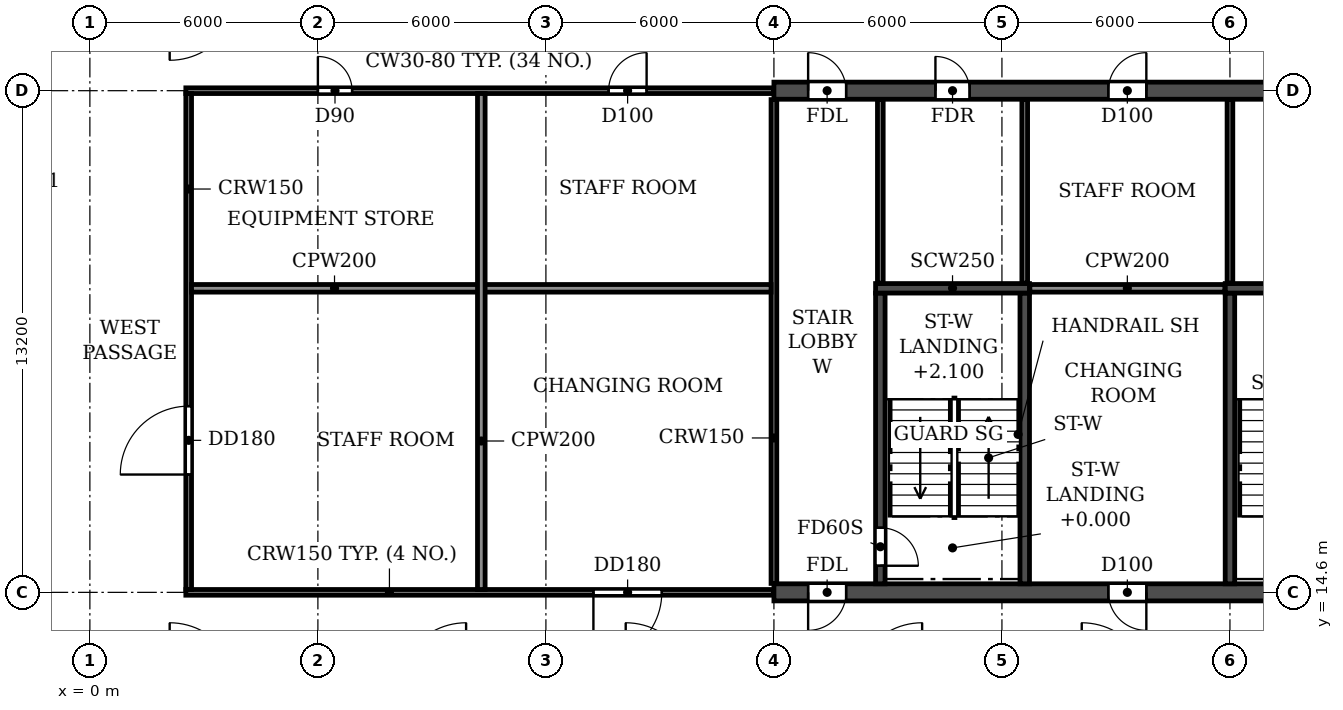
"""IFC4 building model, lengths in metres.
Left out: names, types, materials, properties, quantities, classifications, styles, units other than length and angle.
Written with IfcOpenShell. Run it as: python <this file> out.ifc"""

import sys

from ifc_helpers import new_model, si_unit, direction, frame, frame_2d, origin, place, context, subcontext, project, spatial, rectangle, extrude, element, fill, save


model = new_model("IFC4")
c1 = context("Model", 3, precision=1e-05, world=origin(), true_north=direction((0.0, 1.0)))
c2 = subcontext(c1, "Body", "Model", "MODEL_VIEW")
j1 = project(units=[si_unit("LENGTHUNIT", "METRE"), si_unit("PLANEANGLEUNIT", "RADIAN")], contexts=[c1])
p1 = place(None, origin())
s1 = spatial("IfcSite", under=j1, at=p1, CompositionType="ELEMENT")
p2 = place(p1, origin())
s2 = spatial("IfcBuilding", under=s1, at=p2, CompositionType="ELEMENT")
p3 = place(p2, frame((0.0, 0.0, 19.2)))
s3 = spatial("IfcBuildingStorey", under=s2, at=p3, CompositionType="ELEMENT", Elevation=19.2)
p4 = place(p3, frame((18.0, 14.6, 0.0), z_axis=(0.0, 0.0, 1.0), x_axis=(1.0, 0.0, 0.0)))
e1 = element("IfcWall", 1, at=p4, inside=s3, PredefinedType="SOLIDWALL", context=c2, shape_type="SweptSolid", body=[
    extrude(rectangle(XDim=66.0, YDim=0.45, at=frame_2d((33.0, 0.0))), origin(), (0.0, 0.0, 1.0), 3.95),
])
p5 = place(p4, frame((0.9, 0.0, 0.0)))
e2 = element("IfcOpeningElement", 2, at=p5, cuts=e1, PredefinedType="OPENING", context=c2, shape_type="SweptSolid", body=[
    extrude(rectangle(XDim=1.0, YDim=2.1, at=frame_2d((0.5, 1.05))), frame((0.0, 0.235, 0.0), z_axis=(0.0, -1.0, 0.0), x_axis=(1.0, 0.0, 0.0)), (0.0, 0.0, 1.0), 0.47),
])
p6 = place(p4, frame((8.8, 0.0, 0.0)))
e3 = element("IfcOpeningElement", 3, at=p6, cuts=e1, PredefinedType="OPENING", context=c2, shape_type="SweptSolid", body=[
    extrude(rectangle(XDim=1.0, YDim=2.1, at=frame_2d((0.5, 1.05))), frame((0.0, 0.235, 0.0), z_axis=(0.0, -1.0, 0.0), x_axis=(1.0, 0.0, 0.0)), (0.0, 0.0, 1.0), 0.47),
])
p7 = place(p4, frame((13.4, 0.0, 0.0)))
e4 = element("IfcOpeningElement", 4, at=p7, cuts=e1, PredefinedType="OPENING", context=c2, shape_type="SweptSolid", body=[
    extrude(rectangle(XDim=1.0, YDim=2.1, at=frame_2d((0.5, 1.05))), frame((0.0, 0.235, 0.0), z_axis=(0.0, -1.0, 0.0), x_axis=(1.0, 0.0, 0.0)), (0.0, 0.0, 1.0), 0.47),
])
p8 = place(p4, frame((27.3, 0.0, 0.0)))
e5 = element("IfcOpeningElement", 5, at=p8, cuts=e1, PredefinedType="OPENING", context=c2, shape_type="SweptSolid", body=[
    extrude(rectangle(XDim=1.0, YDim=2.1, at=frame_2d((0.5, 1.05))), frame((0.0, 0.235, 0.0), z_axis=(0.0, -1.0, 0.0), x_axis=(1.0, 0.0, 0.0)), (0.0, 0.0, 1.0), 0.47),
])
p9 = place(p4, frame((32.5, 0.0, 0.0)))
e6 = element("IfcOpeningElement", 6, at=p9, cuts=e1, PredefinedType="OPENING", context=c2, shape_type="SweptSolid", body=[
    extrude(rectangle(XDim=1.0, YDim=2.1, at=frame_2d((0.5, 1.05))), frame((0.0, 0.235, 0.0), z_axis=(0.0, -1.0, 0.0), x_axis=(1.0, 0.0, 0.0)), (0.0, 0.0, 1.0), 0.47),
])
p10 = place(p4, frame((35.1, 0.0, 0.0)))
e7 = element("IfcOpeningElement", 7, at=p10, cuts=e1, PredefinedType="OPENING", context=c2, shape_type="SweptSolid", body=[
    extrude(rectangle(XDim=1.0, YDim=2.1, at=frame_2d((0.5, 1.05))), frame((0.0, 0.235, 0.0), z_axis=(0.0, -1.0, 0.0), x_axis=(1.0, 0.0, 0.0)), (0.0, 0.0, 1.0), 0.47),
])
p11 = place(p4, frame((39.0, 0.0, 0.0)))
e8 = element("IfcOpeningElement", 8, at=p11, cuts=e1, PredefinedType="OPENING", context=c2, shape_type="SweptSolid", body=[
    extrude(rectangle(XDim=1.0, YDim=2.1, at=frame_2d((0.5, 1.05))), frame((0.0, 0.235, 0.0), z_axis=(0.0, -1.0, 0.0), x_axis=(1.0, 0.0, 0.0)), (0.0, 0.0, 1.0), 0.47),
])
p12 = place(p4, frame((51.6, 0.0, 0.0)))
e9 = element("IfcOpeningElement", 9, at=p12, cuts=e1, PredefinedType="OPENING", context=c2, shape_type="SweptSolid", body=[
    extrude(rectangle(XDim=1.0, YDim=2.1, at=frame_2d((0.5, 1.05))), frame((0.0, 0.235, 0.0), z_axis=(0.0, -1.0, 0.0), x_axis=(1.0, 0.0, 0.0)), (0.0, 0.0, 1.0), 0.47),
])
p13 = place(p4, frame((56.25, 0.0, 0.0)))
e10 = element("IfcOpeningElement", 10, at=p13, cuts=e1, PredefinedType="OPENING", context=c2, shape_type="SweptSolid", body=[
    extrude(rectangle(XDim=0.9, YDim=2.1, at=frame_2d((0.45, 1.05))), frame((0.0, 0.235, 0.0), z_axis=(0.0, -1.0, 0.0), x_axis=(1.0, 0.0, 0.0)), (0.0, 0.0, 1.0), 0.47),
])
p14 = place(p4, frame((64.1, 0.0, 0.0)))
e11 = element("IfcOpeningElement", 11, at=p14, cuts=e1, PredefinedType="OPENING", context=c2, shape_type="SweptSolid", body=[
    extrude(rectangle(XDim=1.0, YDim=2.1, at=frame_2d((0.5, 1.05))), frame((0.0, 0.235, 0.0), z_axis=(0.0, -1.0, 0.0), x_axis=(1.0, 0.0, 0.0)), (0.0, 0.0, 1.0), 0.47),
])
p15 = place(p3, frame((18.0, 27.8, 0.0), z_axis=(0.0, 0.0, 1.0), x_axis=(1.0, 0.0, 0.0)))
e12 = element("IfcWall", 12, at=p15, inside=s3, PredefinedType="SOLIDWALL", context=c2, shape_type="SweptSolid", body=[
    extrude(rectangle(XDim=66.0, YDim=0.45, at=frame_2d((33.0, 0.0))), origin(), (0.0, 0.0, 1.0), 3.95),
])
p16 = place(p15, frame((0.9, 0.0, 0.0)))
e13 = element("IfcOpeningElement", 13, at=p16, cuts=e12, PredefinedType="OPENING", context=c2, shape_type="SweptSolid", body=[
    extrude(rectangle(XDim=1.0, YDim=2.1, at=frame_2d((0.5, 1.05))), frame((0.0, 0.235, 0.0), z_axis=(0.0, -1.0, 0.0), x_axis=(1.0, 0.0, 0.0)), (0.0, 0.0, 1.0), 0.47),
])
p17 = place(p15, frame((4.25, 0.0, 0.0)))
e14 = element("IfcOpeningElement", 14, at=p17, cuts=e12, PredefinedType="OPENING", context=c2, shape_type="SweptSolid", body=[
    extrude(rectangle(XDim=0.9, YDim=2.1, at=frame_2d((0.45, 1.05))), frame((0.0, 0.235, 0.0), z_axis=(0.0, -1.0, 0.0), x_axis=(1.0, 0.0, 0.0)), (0.0, 0.0, 1.0), 0.47),
])
p18 = place(p15, frame((8.8, 0.0, 0.0)))
e15 = element("IfcOpeningElement", 15, at=p18, cuts=e12, PredefinedType="OPENING", context=c2, shape_type="SweptSolid", body=[
    extrude(rectangle(XDim=1.0, YDim=2.1, at=frame_2d((0.5, 1.05))), frame((0.0, 0.235, 0.0), z_axis=(0.0, -1.0, 0.0), x_axis=(1.0, 0.0, 0.0)), (0.0, 0.0, 1.0), 0.47),
])
p19 = place(p15, frame((13.45, 0.0, 0.0)))
e16 = element("IfcOpeningElement", 16, at=p19, cuts=e12, PredefinedType="OPENING", context=c2, shape_type="SweptSolid", body=[
    extrude(rectangle(XDim=0.9, YDim=2.1, at=frame_2d((0.45, 1.05))), frame((0.0, 0.235, 0.0), z_axis=(0.0, -1.0, 0.0), x_axis=(1.0, 0.0, 0.0)), (0.0, 0.0, 1.0), 0.47),
])
p20 = place(p15, frame((17.9, 0.0, 0.0)))
e17 = element("IfcOpeningElement", 17, at=p20, cuts=e12, PredefinedType="OPENING", context=c2, shape_type="SweptSolid", body=[
    extrude(rectangle(XDim=1.0, YDim=2.1, at=frame_2d((0.5, 1.05))), frame((0.0, 0.235, 0.0), z_axis=(0.0, -1.0, 0.0), x_axis=(1.0, 0.0, 0.0)), (0.0, 0.0, 1.0), 0.47),
])
p21 = place(p15, frame((22.85, 0.0, 0.0)))
e18 = element("IfcOpeningElement", 18, at=p21, cuts=e12, PredefinedType="OPENING", context=c2, shape_type="SweptSolid", body=[
    extrude(rectangle(XDim=1.5, YDim=2.1, at=frame_2d((0.75, 1.05))), frame((0.0, 0.235, 0.0), z_axis=(0.0, -1.0, 0.0), x_axis=(1.0, 0.0, 0.0)), (0.0, 0.0, 1.0), 0.47),
])
p22 = place(p15, frame((29.6, 0.0, 0.0)))
e19 = element("IfcOpeningElement", 19, at=p22, cuts=e12, PredefinedType="OPENING", context=c2, shape_type="SweptSolid", body=[
    extrude(rectangle(XDim=1.0, YDim=2.1, at=frame_2d((0.5, 1.05))), frame((0.0, 0.235, 0.0), z_axis=(0.0, -1.0, 0.0), x_axis=(1.0, 0.0, 0.0)), (0.0, 0.0, 1.0), 0.47),
])
p23 = place(p15, frame((32.5, 0.0, 0.0)))
e20 = element("IfcOpeningElement", 20, at=p23, cuts=e12, PredefinedType="OPENING", context=c2, shape_type="SweptSolid", body=[
    extrude(rectangle(XDim=1.0, YDim=2.1, at=frame_2d((0.5, 1.05))), frame((0.0, 0.235, 0.0), z_axis=(0.0, -1.0, 0.0), x_axis=(1.0, 0.0, 0.0)), (0.0, 0.0, 1.0), 0.47),
])
p24 = place(p15, frame((38.0, 0.0, 0.0)))
e21 = element("IfcOpeningElement", 21, at=p24, cuts=e12, PredefinedType="OPENING", context=c2, shape_type="SweptSolid", body=[
    extrude(rectangle(XDim=1.0, YDim=2.1, at=frame_2d((0.5, 1.05))), frame((0.0, 0.235, 0.0), z_axis=(0.0, -1.0, 0.0), x_axis=(1.0, 0.0, 0.0)), (0.0, 0.0, 1.0), 0.47),
])
p25 = place(p15, frame((43.2, 0.0, 0.0)))
e22 = element("IfcOpeningElement", 22, at=p25, cuts=e12, PredefinedType="OPENING", context=c2, shape_type="SweptSolid", body=[
    extrude(rectangle(XDim=1.0, YDim=2.1, at=frame_2d((0.5, 1.05))), frame((0.0, 0.235, 0.0), z_axis=(0.0, -1.0, 0.0), x_axis=(1.0, 0.0, 0.0)), (0.0, 0.0, 1.0), 0.47),
])
p26 = place(p15, frame((47.1, 0.0, 0.0)))
e23 = element("IfcOpeningElement", 23, at=p26, cuts=e12, PredefinedType="OPENING", context=c2, shape_type="SweptSolid", body=[
    extrude(rectangle(XDim=1.0, YDim=2.1, at=frame_2d((0.5, 1.05))), frame((0.0, 0.235, 0.0), z_axis=(0.0, -1.0, 0.0), x_axis=(1.0, 0.0, 0.0)), (0.0, 0.0, 1.0), 0.47),
])
p27 = place(p15, frame((51.65, 0.0, 0.0)))
e24 = element("IfcOpeningElement", 24, at=p27, cuts=e12, PredefinedType="OPENING", context=c2, shape_type="SweptSolid", body=[
    extrude(rectangle(XDim=0.9, YDim=2.1, at=frame_2d((0.45, 1.05))), frame((0.0, 0.235, 0.0), z_axis=(0.0, -1.0, 0.0), x_axis=(1.0, 0.0, 0.0)), (0.0, 0.0, 1.0), 0.47),
])
p28 = place(p15, frame((56.2, 0.0, 0.0)))
e25 = element("IfcOpeningElement", 25, at=p28, cuts=e12, PredefinedType="OPENING", context=c2, shape_type="SweptSolid", body=[
    extrude(rectangle(XDim=1.0, YDim=2.1, at=frame_2d((0.5, 1.05))), frame((0.0, 0.235, 0.0), z_axis=(0.0, -1.0, 0.0), x_axis=(1.0, 0.0, 0.0)), (0.0, 0.0, 1.0), 0.47),
])
p29 = place(p15, frame((60.85, 0.0, 0.0)))
e26 = element("IfcOpeningElement", 26, at=p29, cuts=e12, PredefinedType="OPENING", context=c2, shape_type="SweptSolid", body=[
    extrude(rectangle(XDim=0.9, YDim=2.1, at=frame_2d((0.45, 1.05))), frame((0.0, 0.235, 0.0), z_axis=(0.0, -1.0, 0.0), x_axis=(1.0, 0.0, 0.0)), (0.0, 0.0, 1.0), 0.47),
])
p30 = place(p15, frame((64.1, 0.0, 0.0)))
e27 = element("IfcOpeningElement", 27, at=p30, cuts=e12, PredefinedType="OPENING", context=c2, shape_type="SweptSolid", body=[
    extrude(rectangle(XDim=1.0, YDim=2.1, at=frame_2d((0.5, 1.05))), frame((0.0, 0.235, 0.0), z_axis=(0.0, -1.0, 0.0), x_axis=(1.0, 0.0, 0.0)), (0.0, 0.0, 1.0), 0.47),
])
p31 = place(p3, frame((30.0, 14.825, 0.0), z_axis=(0.0, 0.0, 1.0), x_axis=(0.0, 1.0, 0.0)))
e28 = element("IfcWall", 28, at=p31, inside=s3, PredefinedType="SOLIDWALL", context=c2, shape_type="SweptSolid", body=[
    extrude(rectangle(XDim=7.65, YDim=0.25, at=frame_2d((3.825, 0.0))), origin(), (0.0, 0.0, 1.0), 3.95),
])
p32 = place(p3, frame((29.875, 22.6, 0.0), z_axis=(0.0, 0.0, 1.0), x_axis=(1.0, 0.0, 0.0)))
e29 = element("IfcWall", 29, at=p32, inside=s3, PredefinedType="SOLIDWALL", context=c2, shape_type="SweptSolid", body=[
    extrude(rectangle(XDim=4.05, YDim=0.25, at=frame_2d((2.025, 0.0))), origin(), (0.0, 0.0, 1.0), 3.95),
])
p33 = place(p3, frame((20.8, 14.825, 0.0), z_axis=(0.0, 0.0, 1.0), x_axis=(0.0, 1.0, 0.0)))
e30 = element("IfcWall", 30, at=p33, inside=s3, PredefinedType="SOLIDWALL", context=c2, shape_type="SweptSolid", body=[
    extrude(rectangle(XDim=7.65, YDim=0.25, at=frame_2d((3.825, 0.0))), origin(), (0.0, 0.0, 1.0), 3.95),
])
p34 = place(p33, frame((0.475, 0.0, 0.0)))
e31 = element("IfcOpeningElement", 31, at=p34, cuts=e30, PredefinedType="OPENING", context=c2, shape_type="SweptSolid", body=[
    extrude(rectangle(XDim=1.0, YDim=2.1, at=frame_2d((0.5, 1.05))), frame((0.0, 0.135, 0.0), z_axis=(0.0, -1.0, 0.0), x_axis=(1.0, 0.0, 0.0)), (0.0, 0.0, 1.0), 0.27),
])
p35 = place(p3, frame((24.6, 14.825, 0.0), z_axis=(0.0, 0.0, 1.0), x_axis=(0.0, 1.0, 0.0)))
e32 = element("IfcWall", 32, at=p35, inside=s3, PredefinedType="SOLIDWALL", context=c2, shape_type="SweptSolid", body=[
    extrude(rectangle(XDim=7.65, YDim=0.25, at=frame_2d((3.825, 0.0))), origin(), (0.0, 0.0, 1.0), 3.95),
])
p36 = place(p3, frame((20.675, 22.6, 0.0), z_axis=(0.0, 0.0, 1.0), x_axis=(1.0, 0.0, 0.0)))
e33 = element("IfcWall", 33, at=p36, inside=s3, PredefinedType="SOLIDWALL", context=c2, shape_type="SweptSolid", body=[
    extrude(rectangle(XDim=4.05, YDim=0.25, at=frame_2d((2.025, 0.0))), origin(), (0.0, 0.0, 1.0), 3.95),
])
p37 = place(p3, frame((2.525, 14.6, 0.0), z_axis=(0.0, 0.0, 1.0), x_axis=(1.0, 0.0, 0.0)))
e34 = element("IfcWall", 34, at=p37, inside=s3, PredefinedType="PARTITIONING", context=c2, shape_type="SweptSolid", body=[
    extrude(rectangle(XDim=15.465, YDim=0.15, at=frame_2d((7.732, 0.0))), origin(), (0.0, 0.0, 1.0), 3.95),
])
p38 = place(p37, frame((10.725, 0.0, 0.0)))
e35 = element("IfcOpeningElement", 35, at=p38, cuts=e34, PredefinedType="OPENING", context=c2, shape_type="SweptSolid", body=[
    extrude(rectangle(XDim=1.8, YDim=2.1, at=frame_2d((0.9, 1.05))), frame((0.0, 0.085, 0.0), z_axis=(0.0, -1.0, 0.0), x_axis=(1.0, 0.0, 0.0)), (0.0, 0.0, 1.0), 0.17),
])
p39 = place(p3, frame((2.525, 27.8, 0.0), z_axis=(0.0, 0.0, 1.0), x_axis=(1.0, 0.0, 0.0)))
e36 = element("IfcWall", 36, at=p39, inside=s3, PredefinedType="PARTITIONING", context=c2, shape_type="SweptSolid", body=[
    extrude(rectangle(XDim=15.465, YDim=0.15, at=frame_2d((7.732, 0.0))), origin(), (0.0, 0.0, 1.0), 3.95),
])
p40 = place(p39, frame((3.475, 0.0, 0.0)))
e37 = element("IfcOpeningElement", 37, at=p40, cuts=e36, PredefinedType="OPENING", context=c2, shape_type="SweptSolid", body=[
    extrude(rectangle(XDim=0.9, YDim=2.1, at=frame_2d((0.45, 1.05))), frame((0.0, 0.085, 0.0), z_axis=(0.0, -1.0, 0.0), x_axis=(1.0, 0.0, 0.0)), (0.0, 0.0, 1.0), 0.17),
])
p41 = place(p39, frame((11.125, 0.0, 0.0)))
e38 = element("IfcOpeningElement", 38, at=p41, cuts=e36, PredefinedType="OPENING", context=c2, shape_type="SweptSolid", body=[
    extrude(rectangle(XDim=1.0, YDim=2.1, at=frame_2d((0.5, 1.05))), frame((0.0, 0.085, 0.0), z_axis=(0.0, -1.0, 0.0), x_axis=(1.0, 0.0, 0.0)), (0.0, 0.0, 1.0), 0.17),
])
p42 = place(p3, frame((2.6, 14.675, 0.0), z_axis=(0.0, 0.0, 1.0), x_axis=(0.0, 1.0, 0.0)))
e39 = element("IfcWall", 39, at=p42, inside=s3, PredefinedType="PARTITIONING", context=c2, shape_type="SweptSolid", body=[
    extrude(rectangle(XDim=13.05, YDim=0.15, at=frame_2d((6.525, 0.0))), origin(), (0.0, 0.0, 1.0), 3.95),
])
p43 = place(p42, frame((3.025, 0.0, 0.0)))
e40 = element("IfcOpeningElement", 40, at=p43, cuts=e39, PredefinedType="OPENING", context=c2, shape_type="SweptSolid", body=[
    extrude(rectangle(XDim=1.8, YDim=2.1, at=frame_2d((0.9, 1.05))), frame((0.0, 0.085, 0.0), z_axis=(0.0, -1.0, 0.0), x_axis=(1.0, 0.0, 0.0)), (0.0, 0.0, 1.0), 0.17),
])
p44 = place(p3, frame((18.0, 14.835, 0.0), z_axis=(0.0, 0.0, 1.0), x_axis=(0.0, 1.0, 0.0)))
e41 = element("IfcWall", 41, at=p44, inside=s3, PredefinedType="PARTITIONING", context=c2, shape_type="SweptSolid", body=[
    extrude(rectangle(XDim=12.73, YDim=0.15, at=frame_2d((6.365, 0.0))), origin(), (0.0, 0.0, 1.0), 3.95),
])
p45 = place(p3, frame((2.675, 22.6, 0.0), z_axis=(0.0, 0.0, 1.0), x_axis=(1.0, 0.0, 0.0)))
e42 = element("IfcWall", 42, at=p45, inside=s3, PredefinedType="PARTITIONING", context=c2, shape_type="SweptSolid", body=[
    extrude(rectangle(XDim=15.25, YDim=0.2, at=frame_2d((7.625, 0.0))), origin(), (0.0, 0.0, 1.0), 3.95),
])
p46 = place(p3, frame((24.735, 22.6, 0.0), z_axis=(0.0, 0.0, 1.0), x_axis=(1.0, 0.0, 0.0)))
e43 = element("IfcWall", 43, at=p46, inside=s3, PredefinedType="PARTITIONING", context=c2, shape_type="SweptSolid", body=[
    extrude(rectangle(XDim=5.13, YDim=0.2, at=frame_2d((2.565, 0.0))), origin(), (0.0, 0.0, 1.0), 3.95),
])
p47 = place(p3, frame((10.3, 14.675, 0.0), z_axis=(0.0, 0.0, 1.0), x_axis=(0.0, 1.0, 0.0)))
e44 = element("IfcWall", 44, at=p47, inside=s3, PredefinedType="PARTITIONING", context=c2, shape_type="SweptSolid", body=[
    extrude(rectangle(XDim=13.05, YDim=0.2, at=frame_2d((6.525, 0.0))), origin(), (0.0, 0.0, 1.0), 3.95),
])
for number, where, z_axis, x_axis in (
    (45, (20.8, 22.735, 0.0), (0.0, 0.0, 1.0), (0.0, 1.0, 0.0)),
    (46, (24.6, 22.735, 0.0), (0.0, 0.0, 1.0), (0.0, 1.0, 0.0)),
    (47, (30.0, 22.735, 0.0), (0.0, 0.0, 1.0), (0.0, 1.0, 0.0)),
):
    element("IfcWall", number, at=place(p3, frame(where, z_axis=z_axis, x_axis=x_axis)), inside=s3, PredefinedType="PARTITIONING", context=c2, shape_type="SweptSolid", body=[
        extrude(rectangle(XDim=4.83, YDim=0.15, at=frame_2d((2.415, 0.0))), origin(), (0.0, 0.0, 1.0), 3.95),
    ])
p48 = place(p40, origin())
e48 = element("IfcDoor", 48, at=p48, inside=s3, OperationType="SINGLE_SWING_LEFT", PredefinedType="DOOR", context=c2, shape_type="SweptSolid", body=[
    extrude(rectangle(XDim=0.9, YDim=2.1, at=frame_2d((0.45, 1.05))), frame((0.0, 0.025, 0.0), z_axis=(0.0, -1.0, 0.0), x_axis=(1.0, 0.0, 0.0)), (0.0, 0.0, 1.0), 0.05),
])
fill(e37, e48)
p49 = place(p41, origin())
e49 = element("IfcDoor", 49, at=p49, inside=s3, OperationType="SINGLE_SWING_RIGHT", PredefinedType="DOOR", context=c2, shape_type="SweptSolid", body=[
    extrude(rectangle(XDim=1.0, YDim=2.1, at=frame_2d((0.5, 1.05))), frame((0.0, 0.025, 0.0), z_axis=(0.0, -1.0, 0.0), x_axis=(1.0, 0.0, 0.0)), (0.0, 0.0, 1.0), 0.05),
])
fill(e38, e49)
p50 = place(p16, origin())
e50 = element("IfcDoor", 50, at=p50, inside=s3, OperationType="SINGLE_SWING_LEFT", PredefinedType="DOOR", context=c2, shape_type="SweptSolid", body=[
    extrude(rectangle(XDim=1.0, YDim=2.1, at=frame_2d((0.5, 1.05))), frame((0.0, 0.025, 0.0), z_axis=(0.0, -1.0, 0.0), x_axis=(1.0, 0.0, 0.0)), (0.0, 0.0, 1.0), 0.05),
])
fill(e13, e50)
p51 = place(p17, origin())
e51 = element("IfcDoor", 51, at=p51, inside=s3, OperationType="SINGLE_SWING_LEFT", PredefinedType="DOOR", context=c2, shape_type="SweptSolid", body=[
    extrude(rectangle(XDim=0.9, YDim=2.1, at=frame_2d((0.45, 1.05))), frame((0.0, 0.025, 0.0), z_axis=(0.0, -1.0, 0.0), x_axis=(1.0, 0.0, 0.0)), (0.0, 0.0, 1.0), 0.05),
])
fill(e14, e51)
p52 = place(p18, origin())
e52 = element("IfcDoor", 52, at=p52, inside=s3, OperationType="SINGLE_SWING_RIGHT", PredefinedType="DOOR", context=c2, shape_type="SweptSolid", body=[
    extrude(rectangle(XDim=1.0, YDim=2.1, at=frame_2d((0.5, 1.05))), frame((0.0, 0.025, 0.0), z_axis=(0.0, -1.0, 0.0), x_axis=(1.0, 0.0, 0.0)), (0.0, 0.0, 1.0), 0.05),
])
fill(e15, e52)
p53 = place(p38, frame((1.8, 0.0, 0.0), z_axis=(0.0, 0.0, 1.0), x_axis=(-1.0, 0.0, 0.0)))
e53 = element("IfcDoor", 53, at=p53, inside=s3, OperationType="DOUBLE_DOOR_SINGLE_SWING", PredefinedType="DOOR", context=c2, shape_type="SweptSolid", body=[
    extrude(rectangle(XDim=1.8, YDim=2.1, at=frame_2d((0.9, 1.05))), frame((0.0, 0.025, 0.0), z_axis=(0.0, -1.0, 0.0), x_axis=(1.0, 0.0, 0.0)), (0.0, 0.0, 1.0), 0.05),
])
fill(e35, e53)
p54 = place(p5, frame((1.0, 0.0, 0.0), z_axis=(0.0, 0.0, 1.0), x_axis=(-1.0, 0.0, 0.0)))
e54 = element("IfcDoor", 54, at=p54, inside=s3, OperationType="SINGLE_SWING_RIGHT", PredefinedType="DOOR", context=c2, shape_type="SweptSolid", body=[
    extrude(rectangle(XDim=1.0, YDim=2.1, at=frame_2d((0.5, 1.05))), frame((0.0, 0.025, 0.0), z_axis=(0.0, -1.0, 0.0), x_axis=(1.0, 0.0, 0.0)), (0.0, 0.0, 1.0), 0.05),
])
fill(e2, e54)
p55 = place(p6, frame((1.0, 0.0, 0.0), z_axis=(0.0, 0.0, 1.0), x_axis=(-1.0, 0.0, 0.0)))
e55 = element("IfcDoor", 55, at=p55, inside=s3, OperationType="SINGLE_SWING_LEFT", PredefinedType="DOOR", context=c2, shape_type="SweptSolid", body=[
    extrude(rectangle(XDim=1.0, YDim=2.1, at=frame_2d((0.5, 1.05))), frame((0.0, 0.025, 0.0), z_axis=(0.0, -1.0, 0.0), x_axis=(1.0, 0.0, 0.0)), (0.0, 0.0, 1.0), 0.05),
])
fill(e3, e55)
p56 = place(p43, origin())
e56 = element("IfcDoor", 56, at=p56, inside=s3, OperationType="DOUBLE_DOOR_SINGLE_SWING", PredefinedType="DOOR", context=c2, shape_type="SweptSolid", body=[
    extrude(rectangle(XDim=1.8, YDim=2.1, at=frame_2d((0.9, 1.05))), frame((0.0, 0.025, 0.0), z_axis=(0.0, -1.0, 0.0), x_axis=(1.0, 0.0, 0.0)), (0.0, 0.0, 1.0), 0.05),
])
fill(e40, e56)
p57 = place(p34, frame((1.0, 0.0, 0.0), z_axis=(0.0, 0.0, 1.0), x_axis=(-1.0, 0.0, 0.0)))
e57 = element("IfcDoor", 57, at=p57, inside=s3, OperationType="SINGLE_SWING_RIGHT", PredefinedType="DOOR", context=c2, shape_type="SweptSolid", body=[
    extrude(rectangle(XDim=1.0, YDim=2.1, at=frame_2d((0.5, 1.05))), frame((0.0, 0.025, 0.0), z_axis=(0.0, -1.0, 0.0), x_axis=(1.0, 0.0, 0.0)), (0.0, 0.0, 1.0), 0.05),
])
fill(e31, e57)
save(model, sys.argv[1])
